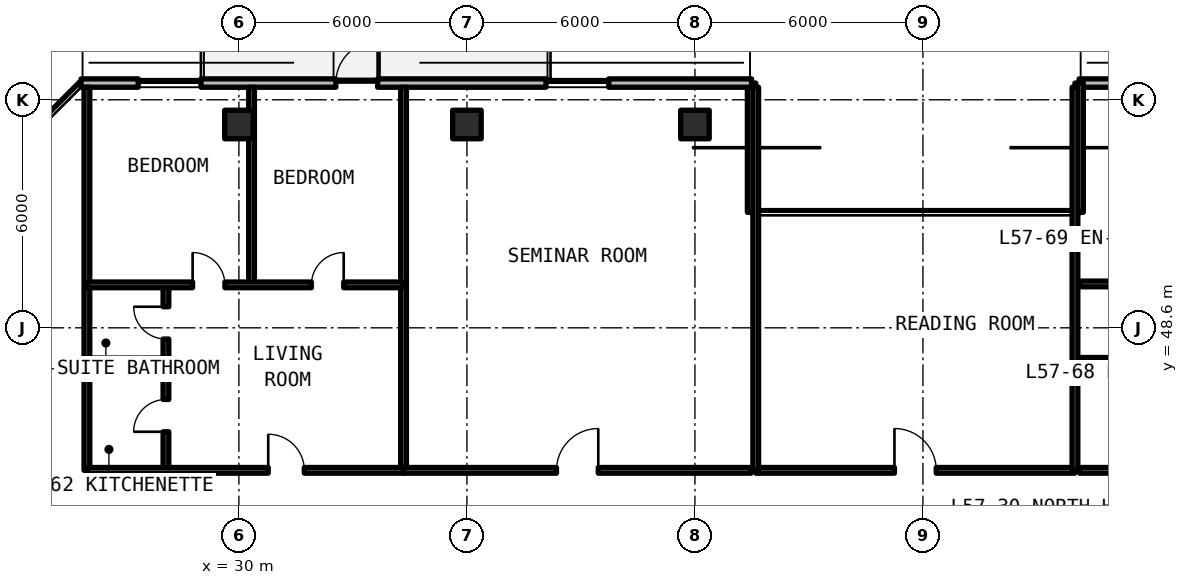
"""IFC4 building model, lengths in metres.
Left out: names, types, materials, properties, quantities, classifications, styles, units other than length and angle.
Written with IfcOpenShell. Run it as: python <this file> out.ifc"""

import sys

from ifc_helpers import new_model, si_unit, direction, frame, frame_2d, origin, origin_2d, place, context, subcontext, project, spatial, rectangle, extrude, element, fill, save


model = new_model("IFC4")
c1 = context("Model", 3, precision=1e-05, world=origin(), true_north=direction((0.0, 1.0)))
c2 = subcontext(c1, "Body", "Model", "MODEL_VIEW")
j1 = project(units=[si_unit("LENGTHUNIT", "METRE"), si_unit("PLANEANGLEUNIT", "RADIAN")], contexts=[c1])
p1 = place(None, origin())
s1 = spatial("IfcSite", under=j1, at=p1, CompositionType="ELEMENT")
p2 = place(p1, origin())
s2 = spatial("IfcBuilding", under=s1, at=p2, CompositionType="ELEMENT")
p3 = place(p2, frame((0.0, 0.0, 204.93)))
s3 = spatial("IfcBuildingStorey", under=s2, at=p3, CompositionType="ELEMENT", Elevation=204.93)
for number, where, z_axis, x_axis in (
    (1, (30.0, 53.95, 0.0), (0.0, 0.0, 1.0), (1.0, 0.0, 0.0)),
    (2, (36.0, 53.95, 0.0), (0.0, 0.0, 1.0), (1.0, 0.0, 0.0)),
    (3, (42.0, 53.95, 0.0), (0.0, 0.0, 1.0), (1.0, 0.0, 0.0)),
):
    element("IfcColumn", number, at=place(p3, frame(where, z_axis=z_axis, x_axis=x_axis)), inside=s3, PredefinedType="COLUMN", context=c2, shape_type="SweptSolid", body=[
        extrude(rectangle(XDim=0.75, YDim=0.75, at=origin_2d()), origin(), (0.0, 0.0, 1.0), 3.3),
    ])
p4 = place(p3, frame((95.354, 55.04, 0.0), z_axis=(0.0, 0.0, 1.0), x_axis=(-1.0, 0.0, 0.0)))
e4 = element("IfcWall", 4, at=p4, inside=s3, PredefinedType="SOLIDWALL", context=c2, shape_type="SweptSolid", body=[
    extrude(rectangle(XDim=43.244, YDim=0.22, at=frame_2d((21.622, 0.0))), origin(), (0.0, 0.0, 1.0), 3.08),
])
p5 = place(p4, frame((26.404, 0.0, 0.0)))
e5 = element("IfcOpeningElement", 5, at=p5, cuts=e4, PredefinedType="OPENING", context=c2, shape_type="SweptSolid", body=[
    extrude(rectangle(XDim=1.1, YDim=2.15, at=frame_2d((0.55, 1.075))), frame((0.0, 0.12, 0.0), z_axis=(0.0, -1.0, 0.0), x_axis=(1.0, 0.0, 0.0)), (0.0, 0.0, 1.0), 0.24),
])
p6 = place(p4, frame((15.004, 0.0, 0.0)))
e6 = element("IfcOpeningElement", 6, at=p6, cuts=e4, PredefinedType="OPENING", context=c2, shape_type="SweptSolid", body=[
    extrude(rectangle(XDim=1.1, YDim=2.15, at=frame_2d((0.55, 1.075))), frame((0.0, 0.12, 0.0), z_axis=(0.0, -1.0, 0.0), x_axis=(1.0, 0.0, 0.0)), (0.0, 0.0, 1.0), 0.24),
])
p7 = place(p4, frame((38.909, 0.0, 0.78)))
e7 = element("IfcOpeningElement", 7, at=p7, cuts=e4, PredefinedType="OPENING", context=c2, shape_type="SweptSolid", body=[
    extrude(rectangle(XDim=1.65, YDim=1.66, at=frame_2d((0.825, 0.83))), frame((0.0, 0.12, 0.0), z_axis=(0.0, -1.0, 0.0), x_axis=(1.0, 0.0, 0.0)), (0.0, 0.0, 1.0), 0.24),
])
p8 = place(p4, frame((33.615, 0.0, 0.78)))
e8 = element("IfcOpeningElement", 8, at=p8, cuts=e4, PredefinedType="OPENING", context=c2, shape_type="SweptSolid", body=[
    extrude(rectangle(XDim=0.85, YDim=1.65, at=frame_2d((0.425, 0.825))), frame((0.0, 0.12, 0.0), z_axis=(0.0, -1.0, 0.0), x_axis=(1.0, 0.0, 0.0)), (0.0, 0.0, 1.0), 0.24),
])
p9 = place(p4, frame((20.894, 0.0, 0.78)))
e9 = element("IfcOpeningElement", 9, at=p9, cuts=e4, PredefinedType="OPENING", context=c2, shape_type="SweptSolid", body=[
    extrude(rectangle(XDim=1.65, YDim=1.66, at=frame_2d((0.825, 0.83))), frame((0.0, 0.12, 0.0), z_axis=(0.0, -1.0, 0.0), x_axis=(1.0, 0.0, 0.0)), (0.0, 0.0, 1.0), 0.24),
])
p10 = place(p4, frame((8.792, 0.0, 0.78)))
e10 = element("IfcOpeningElement", 10, at=p10, cuts=e4, PredefinedType="OPENING", context=c2, shape_type="SweptSolid", body=[
    extrude(rectangle(XDim=1.65, YDim=1.66, at=frame_2d((0.825, 0.83))), frame((0.0, 0.12, 0.0), z_axis=(0.0, -1.0, 0.0), x_axis=(1.0, 0.0, 0.0)), (0.0, 0.0, 1.0), 0.24),
])
p11 = place(p4, frame((2.487, 0.0, 0.78)))
e11 = element("IfcOpeningElement", 11, at=p11, cuts=e4, PredefinedType="OPENING", context=c2, shape_type="SweptSolid", body=[
    extrude(rectangle(XDim=1.65, YDim=1.66, at=frame_2d((0.825, 0.83))), frame((0.0, 0.12, 0.0), z_axis=(0.0, -1.0, 0.0), x_axis=(1.0, 0.0, 0.0)), (0.0, 0.0, 1.0), 0.24),
])
for number, where, z_axis, x_axis in (
    (12, (52.11, 55.04, 0.0), (0.0, 0.0, 1.0), (0.0, -1.0, 0.0)),
    (13, (43.49, 51.64, 0.0), (0.0, 0.0, 1.0), (0.0, 1.0, 0.0)),
):
    element("IfcWall", number, at=place(p3, frame(where, z_axis=z_axis, x_axis=x_axis)), inside=s3, PredefinedType="SOLIDWALL", context=c2, shape_type="SweptSolid", body=[
        extrude(rectangle(XDim=3.4, YDim=0.22, at=frame_2d((1.7, 0.0))), origin(), (0.0, 0.0, 1.0), 3.08),
    ])
p12 = place(p3, frame((43.49, 55.04, 0.0), z_axis=(0.0, 0.0, 1.0), x_axis=(-1.0, 0.0, 0.0)))
e14 = element("IfcWall", 14, at=p12, inside=s3, PredefinedType="SOLIDWALL", context=c2, shape_type="SweptSolid", body=[
    extrude(rectangle(XDim=17.644, YDim=0.22, at=frame_2d((8.822, 0.0))), origin(), (0.0, 0.0, 1.0), 3.08),
])
p13 = place(p12, frame((9.84, 0.0, 0.0)))
e15 = element("IfcOpeningElement", 15, at=p13, cuts=e14, PredefinedType="OPENING", context=c2, shape_type="SweptSolid", body=[
    extrude(rectangle(XDim=1.1, YDim=2.15, at=frame_2d((0.55, 1.075))), frame((0.0, 0.12, 0.0), z_axis=(0.0, -1.0, 0.0), x_axis=(1.0, 0.0, 0.0)), (0.0, 0.0, 1.0), 0.24),
])
p14 = place(p12, frame((14.489, 0.0, 0.78)))
e16 = element("IfcOpeningElement", 16, at=p14, cuts=e14, PredefinedType="OPENING", context=c2, shape_type="SweptSolid", body=[
    extrude(rectangle(XDim=1.65, YDim=1.66, at=frame_2d((0.825, 0.83))), frame((0.0, 0.12, 0.0), z_axis=(0.0, -1.0, 0.0), x_axis=(1.0, 0.0, 0.0)), (0.0, 0.0, 1.0), 0.24),
])
p15 = place(p12, frame((3.759, 0.0, 0.78)))
e17 = element("IfcOpeningElement", 17, at=p15, cuts=e14, PredefinedType="OPENING", context=c2, shape_type="SweptSolid", body=[
    extrude(rectangle(XDim=1.65, YDim=1.66, at=frame_2d((0.825, 0.83))), frame((0.0, 0.12, 0.0), z_axis=(0.0, -1.0, 0.0), x_axis=(1.0, 0.0, 0.0)), (0.0, 0.0, 1.0), 0.24),
])
p16 = place(p3, frame((43.6, 44.85, 0.0), z_axis=(0.0, 0.0, 1.0), x_axis=(1.0, 0.0, 0.0)))
e18 = element("IfcWall", 18, at=p16, inside=s3, PredefinedType="SOLIDWALL", context=c2, shape_type="SweptSolid", body=[
    extrude(rectangle(XDim=8.4, YDim=0.15, at=frame_2d((4.2, 0.0))), origin(), (0.0, 0.0, 1.0), 2.35),
])
p17 = place(p16, frame((3.65, 0.0, 0.0)))
e19 = element("IfcOpeningElement", 19, at=p17, cuts=e18, PredefinedType="OPENING", context=c2, shape_type="SweptSolid", body=[
    extrude(rectangle(XDim=1.1, YDim=2.15, at=frame_2d((0.55, 1.075))), frame((0.0, 0.085, 0.0), z_axis=(0.0, -1.0, 0.0), x_axis=(1.0, 0.0, 0.0)), (0.0, 0.0, 1.0), 0.17),
])
for number, where, z_axis, x_axis in (
    (20, (43.6, 44.85, 0.0), (0.0, 0.0, 1.0), (0.0, 1.0, 0.0)),
    (21, (52.0, 44.85, 0.0), (0.0, 0.0, 1.0), (0.0, 1.0, 0.0)),
    (22, (26.0, 44.85, 0.0), (0.0, 0.0, 1.0), (0.0, 1.0, 0.0)),
    (23, (34.333, 44.85, 0.0), (0.0, 0.0, 1.0), (0.0, 1.0, 0.0)),
):
    element("IfcWall", number, at=place(p3, frame(where, z_axis=z_axis, x_axis=x_axis)), inside=s3, PredefinedType="SOLIDWALL", context=c2, shape_type="SweptSolid", body=[
        extrude(rectangle(XDim=10.08, YDim=0.15, at=frame_2d((5.04, 0.0))), origin(), (0.0, 0.0, 1.0), 2.35),
    ])
p18 = place(p3, frame((26.0, 47.729, 0.0), z_axis=(0.0, 0.0, 1.0), x_axis=(1.0, 0.0, 0.0)))
e24 = element("IfcWall", 24, at=p18, inside=s3, PredefinedType="PARTITIONING", context=c2, shape_type="SweptSolid", body=[
    extrude(rectangle(XDim=2.08, YDim=0.15, at=frame_2d((1.04, 0.0))), origin(), (0.0, 0.0, 1.0), 2.35),
])
p19 = place(p3, frame((28.08, 44.85, 0.0), z_axis=(0.0, 0.0, 1.0), x_axis=(0.0, 1.0, 0.0)))
e25 = element("IfcWall", 25, at=p19, inside=s3, PredefinedType="PARTITIONING", context=c2, shape_type="SweptSolid", body=[
    extrude(rectangle(XDim=4.88, YDim=0.15, at=frame_2d((2.44, 0.0))), origin(), (0.0, 0.0, 1.0), 2.35),
])
p20 = place(p19, frame((1.015, 0.0, 0.0)))
e26 = element("IfcOpeningElement", 26, at=p20, cuts=e25, PredefinedType="OPENING", context=c2, shape_type="SweptSolid", body=[
    extrude(rectangle(XDim=0.85, YDim=2.1, at=frame_2d((0.425, 1.05))), frame((0.0, 0.085, 0.0), z_axis=(0.0, -1.0, 0.0), x_axis=(1.0, 0.0, 0.0)), (0.0, 0.0, 1.0), 0.17),
])
p21 = place(p19, frame((3.455, 0.0, 0.0)))
e27 = element("IfcOpeningElement", 27, at=p21, cuts=e25, PredefinedType="OPENING", context=c2, shape_type="SweptSolid", body=[
    extrude(rectangle(XDim=0.85, YDim=2.1, at=frame_2d((0.425, 1.05))), frame((0.0, 0.085, 0.0), z_axis=(0.0, -1.0, 0.0), x_axis=(1.0, 0.0, 0.0)), (0.0, 0.0, 1.0), 0.17),
])
p22 = place(p3, frame((30.333, 49.73, 0.0), z_axis=(0.0, 0.0, 1.0), x_axis=(0.0, 1.0, 0.0)))
e28 = element("IfcWall", 28, at=p22, inside=s3, PredefinedType="PARTITIONING", context=c2, shape_type="SweptSolid", body=[
    extrude(rectangle(XDim=5.2, YDim=0.15, at=frame_2d((2.6, 0.0))), origin(), (0.0, 0.0, 1.0), 2.35),
])
p23 = place(p3, frame((26.0, 49.73, 0.0), z_axis=(0.0, 0.0, 1.0), x_axis=(1.0, 0.0, 0.0)))
e29 = element("IfcWall", 29, at=p23, inside=s3, PredefinedType="PARTITIONING", context=c2, shape_type="SweptSolid", body=[
    extrude(rectangle(XDim=8.333, YDim=0.15, at=frame_2d((4.166, 0.0))), origin(), (0.0, 0.0, 1.0), 2.35),
])
p24 = place(p23, frame((2.781, 0.0, 0.0)))
e30 = element("IfcOpeningElement", 30, at=p24, cuts=e29, PredefinedType="OPENING", context=c2, shape_type="SweptSolid", body=[
    extrude(rectangle(XDim=0.85, YDim=2.1, at=frame_2d((0.425, 1.05))), frame((0.0, 0.085, 0.0), z_axis=(0.0, -1.0, 0.0), x_axis=(1.0, 0.0, 0.0)), (0.0, 0.0, 1.0), 0.17),
])
p25 = place(p23, frame((5.908, 0.0, 0.0)))
e31 = element("IfcOpeningElement", 31, at=p25, cuts=e29, PredefinedType="OPENING", context=c2, shape_type="SweptSolid", body=[
    extrude(rectangle(XDim=0.85, YDim=2.1, at=frame_2d((0.425, 1.05))), frame((0.0, 0.085, 0.0), z_axis=(0.0, -1.0, 0.0), x_axis=(1.0, 0.0, 0.0)), (0.0, 0.0, 1.0), 0.17),
])
p26 = place(p3, frame((26.0, 44.85, 0.0), z_axis=(0.0, 0.0, 1.0), x_axis=(1.0, 0.0, 0.0)))
e32 = element("IfcWall", 32, at=p26, inside=s3, PredefinedType="SOLIDWALL", context=c2, shape_type="SweptSolid", body=[
    extrude(rectangle(XDim=8.333, YDim=0.15, at=frame_2d((4.166, 0.0))), origin(), (0.0, 0.0, 1.0), 2.35),
])
p27 = place(p26, frame((4.771, 0.0, 0.0)))
e33 = element("IfcOpeningElement", 33, at=p27, cuts=e32, PredefinedType="OPENING", context=c2, shape_type="SweptSolid", body=[
    extrude(rectangle(XDim=0.95, YDim=2.15, at=frame_2d((0.475, 1.075))), frame((0.0, 0.085, 0.0), z_axis=(0.0, -1.0, 0.0), x_axis=(1.0, 0.0, 0.0)), (0.0, 0.0, 1.0), 0.17),
])
p28 = place(p3, frame((34.333, 44.85, 0.0), z_axis=(0.0, 0.0, 1.0), x_axis=(1.0, 0.0, 0.0)))
e34 = element("IfcWall", 34, at=p28, inside=s3, PredefinedType="SOLIDWALL", context=c2, shape_type="SweptSolid", body=[
    extrude(rectangle(XDim=9.147, YDim=0.15, at=frame_2d((4.574, 0.0))), origin(), (0.0, 0.0, 1.0), 2.35),
])
p29 = place(p28, frame((4.024, 0.0, 0.0)))
e35 = element("IfcOpeningElement", 35, at=p29, cuts=e34, PredefinedType="OPENING", context=c2, shape_type="SweptSolid", body=[
    extrude(rectangle(XDim=1.1, YDim=2.15, at=frame_2d((0.55, 1.075))), frame((0.0, 0.085, 0.0), z_axis=(0.0, -1.0, 0.0), x_axis=(1.0, 0.0, 0.0)), (0.0, 0.0, 1.0), 0.17),
])
p30 = place(p3, frame((52.12, 47.744, 0.0), z_axis=(0.0, 0.0, 1.0), x_axis=(1.0, 0.0, 0.0)))
e36 = element("IfcWall", 36, at=p30, inside=s3, PredefinedType="PARTITIONING", context=c2, shape_type="SweptSolid", body=[
    extrude(rectangle(XDim=3.8, YDim=0.15, at=frame_2d((1.9, 0.0))), origin(), (0.0, 0.0, 1.0), 2.35),
])
p31 = place(p3, frame((52.12, 49.755, 0.0), z_axis=(0.0, 0.0, 1.0), x_axis=(1.0, 0.0, 0.0)))
e37 = element("IfcWall", 37, at=p31, inside=s3, PredefinedType="PARTITIONING", context=c2, shape_type="SweptSolid", body=[
    extrude(rectangle(XDim=10.15, YDim=0.15, at=frame_2d((5.075, 0.0))), origin(), (0.0, 0.0, 1.0), 2.35),
])
p32 = place(p31, frame((4.325, 0.0, 0.0)))
e38 = element("IfcOpeningElement", 38, at=p32, cuts=e37, PredefinedType="OPENING", context=c2, shape_type="SweptSolid", body=[
    extrude(rectangle(XDim=0.85, YDim=2.1, at=frame_2d((0.425, 1.05))), frame((0.0, 0.085, 0.0), z_axis=(0.0, -1.0, 0.0), x_axis=(1.0, 0.0, 0.0)), (0.0, 0.0, 1.0), 0.17),
])
p33 = place(p31, frame((7.5, 0.0, 0.0)))
e39 = element("IfcOpeningElement", 39, at=p33, cuts=e37, PredefinedType="OPENING", context=c2, shape_type="SweptSolid", body=[
    extrude(rectangle(XDim=0.85, YDim=2.1, at=frame_2d((0.425, 1.05))), frame((0.0, 0.085, 0.0), z_axis=(0.0, -1.0, 0.0), x_axis=(1.0, 0.0, 0.0)), (0.0, 0.0, 1.0), 0.17),
])
p34 = place(p3, frame((52.12, 44.85, 0.0), z_axis=(0.0, 0.0, 1.0), x_axis=(1.0, 0.0, 0.0)))
e40 = element("IfcWall", 40, at=p34, inside=s3, PredefinedType="SOLIDWALL", context=c2, shape_type="SweptSolid", body=[
    extrude(rectangle(XDim=10.15, YDim=0.15, at=frame_2d((5.075, 0.0))), origin(), (0.0, 0.0, 1.0), 2.35),
])
p35 = place(p34, frame((6.54, 0.0, 0.0)))
e41 = element("IfcOpeningElement", 41, at=p35, cuts=e40, PredefinedType="OPENING", context=c2, shape_type="SweptSolid", body=[
    extrude(rectangle(XDim=0.95, YDim=2.15, at=frame_2d((0.475, 1.075))), frame((0.0, 0.085, 0.0), z_axis=(0.0, -1.0, 0.0), x_axis=(1.0, 0.0, 0.0)), (0.0, 0.0, 1.0), 0.17),
])
p36 = place(p13, frame((1.1, 0.0, 0.0), z_axis=(0.0, 0.0, 1.0), x_axis=(-1.0, 0.0, 0.0)))
e42 = element("IfcDoor", 42, at=p36, inside=s3, OperationType="SINGLE_SWING_RIGHT", PredefinedType="DOOR", context=c2, shape_type="SweptSolid", body=[
    extrude(rectangle(XDim=1.1, YDim=2.15, at=frame_2d((0.55, 1.075))), frame((0.0, 0.025, 0.0), z_axis=(0.0, -1.0, 0.0), x_axis=(1.0, 0.0, 0.0)), (0.0, 0.0, 1.0), 0.05),
])
fill(e15, e42)
p37 = place(p14, origin())
e43 = element("IfcWindow", 43, at=p37, inside=s3, PartitioningType="SINGLE_PANEL", PredefinedType="WINDOW", context=c2, shape_type="SweptSolid", body=[
    extrude(rectangle(XDim=1.65, YDim=1.66, at=frame_2d((0.825, 0.83))), frame((0.0, 0.03, 0.0), z_axis=(0.0, -1.0, 0.0), x_axis=(1.0, 0.0, 0.0)), (0.0, 0.0, 1.0), 0.06),
])
fill(e16, e43)
p38 = place(p15, origin())
e44 = element("IfcWindow", 44, at=p38, inside=s3, PartitioningType="SINGLE_PANEL", PredefinedType="WINDOW", context=c2, shape_type="SweptSolid", body=[
    extrude(rectangle(XDim=1.65, YDim=1.66, at=frame_2d((0.825, 0.83))), frame((0.0, 0.03, 0.0), z_axis=(0.0, -1.0, 0.0), x_axis=(1.0, 0.0, 0.0)), (0.0, 0.0, 1.0), 0.06),
])
fill(e17, e44)
p39 = place(p17, origin())
e45 = element("IfcDoor", 45, at=p39, inside=s3, OperationType="SINGLE_SWING_LEFT", PredefinedType="DOOR", context=c2, shape_type="SweptSolid", body=[
    extrude(rectangle(XDim=1.1, YDim=2.15, at=frame_2d((0.55, 1.075))), frame((0.0, 0.025, 0.0), z_axis=(0.0, -1.0, 0.0), x_axis=(1.0, 0.0, 0.0)), (0.0, 0.0, 1.0), 0.05),
])
fill(e19, e45)
p40 = place(p20, origin())
e46 = element("IfcDoor", 46, at=p40, inside=s3, OperationType="SINGLE_SWING_LEFT", PredefinedType="DOOR", context=c2, shape_type="SweptSolid", body=[
    extrude(rectangle(XDim=0.85, YDim=2.1, at=frame_2d((0.425, 1.05))), frame((0.0, 0.025, 0.0), z_axis=(0.0, -1.0, 0.0), x_axis=(1.0, 0.0, 0.0)), (0.0, 0.0, 1.0), 0.05),
])
fill(e26, e46)
p41 = place(p21, origin())
e47 = element("IfcDoor", 47, at=p41, inside=s3, OperationType="SINGLE_SWING_RIGHT", PredefinedType="DOOR", context=c2, shape_type="SweptSolid", body=[
    extrude(rectangle(XDim=0.85, YDim=2.1, at=frame_2d((0.425, 1.05))), frame((0.0, 0.025, 0.0), z_axis=(0.0, -1.0, 0.0), x_axis=(1.0, 0.0, 0.0)), (0.0, 0.0, 1.0), 0.05),
])
fill(e27, e47)
p42 = place(p24, origin())
e48 = element("IfcDoor", 48, at=p42, inside=s3, OperationType="SINGLE_SWING_LEFT", PredefinedType="DOOR", context=c2, shape_type="SweptSolid", body=[
    extrude(rectangle(XDim=0.85, YDim=2.1, at=frame_2d((0.425, 1.05))), frame((0.0, 0.025, 0.0), z_axis=(0.0, -1.0, 0.0), x_axis=(1.0, 0.0, 0.0)), (0.0, 0.0, 1.0), 0.05),
])
fill(e30, e48)
p43 = place(p25, origin())
e49 = element("IfcDoor", 49, at=p43, inside=s3, OperationType="SINGLE_SWING_RIGHT", PredefinedType="DOOR", context=c2, shape_type="SweptSolid", body=[
    extrude(rectangle(XDim=0.85, YDim=2.1, at=frame_2d((0.425, 1.05))), frame((0.0, 0.025, 0.0), z_axis=(0.0, -1.0, 0.0), x_axis=(1.0, 0.0, 0.0)), (0.0, 0.0, 1.0), 0.05),
])
fill(e31, e49)
p44 = place(p27, origin())
e50 = element("IfcDoor", 50, at=p44, inside=s3, OperationType="SINGLE_SWING_LEFT", PredefinedType="DOOR", context=c2, shape_type="SweptSolid", body=[
    extrude(rectangle(XDim=0.95, YDim=2.15, at=frame_2d((0.475, 1.075))), frame((0.0, 0.025, 0.0), z_axis=(0.0, -1.0, 0.0), x_axis=(1.0, 0.0, 0.0)), (0.0, 0.0, 1.0), 0.05),
])
fill(e33, e50)
p45 = place(p29, origin())
e51 = element("IfcDoor", 51, at=p45, inside=s3, OperationType="SINGLE_SWING_RIGHT", PredefinedType="DOOR", context=c2, shape_type="SweptSolid", body=[
    extrude(rectangle(XDim=1.1, YDim=2.15, at=frame_2d((0.55, 1.075))), frame((0.0, 0.025, 0.0), z_axis=(0.0, -1.0, 0.0), x_axis=(1.0, 0.0, 0.0)), (0.0, 0.0, 1.0), 0.05),
])
fill(e35, e51)
save(model, sys.argv[1])
